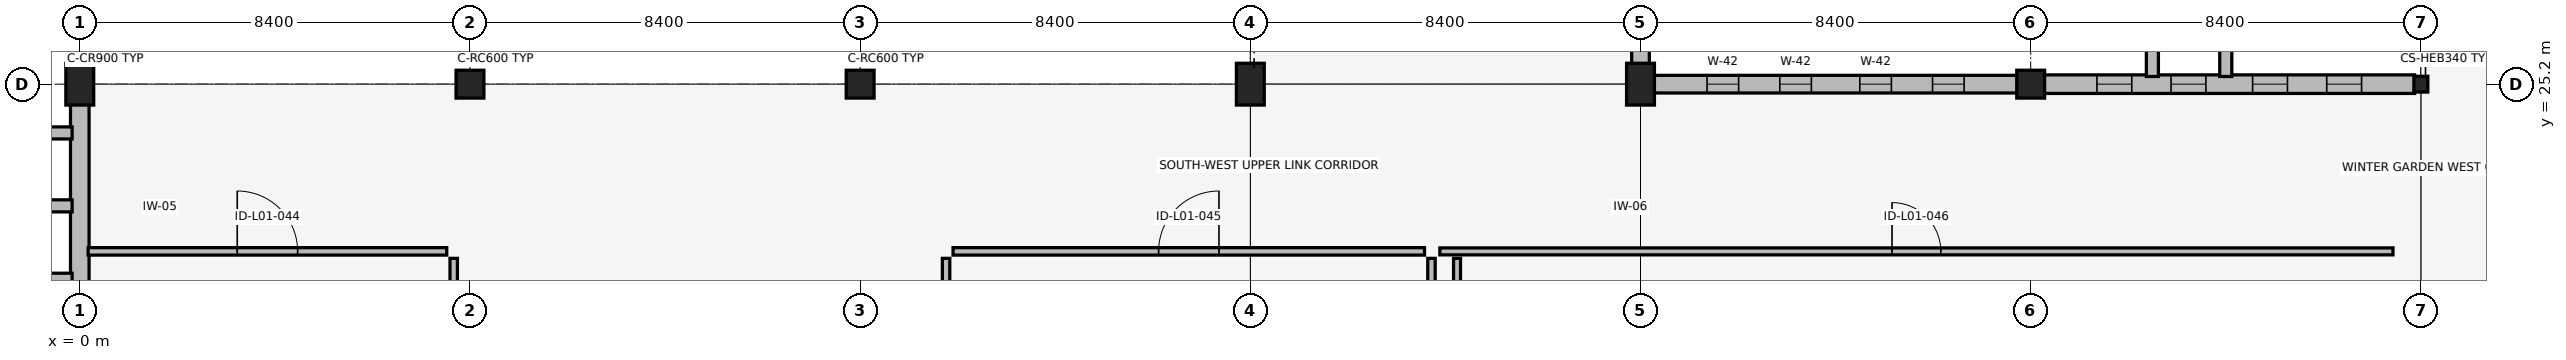
"""IFC4 building model, lengths in metres.
Left out: names, types, materials, properties, quantities, classifications, styles, units other than length and angle.
Written with IfcOpenShell. Run it as: python <this file> out.ifc"""

import sys

from ifc_helpers import new_model, si_unit, direction, frame, frame_2d, origin, origin_2d, place, context, subcontext, project, spatial, rectangle, i_section, extrude, element, fill, save


model = new_model("IFC4")
c1 = context("Model", 3, precision=1e-05, world=origin(), true_north=direction((0.0, 1.0)))
c2 = subcontext(c1, "Body", "Model", "MODEL_VIEW")
j1 = project(units=[si_unit("LENGTHUNIT", "METRE"), si_unit("PLANEANGLEUNIT", "RADIAN")], contexts=[c1])
p1 = place(None, origin())
s1 = spatial("IfcSite", under=j1, at=p1, CompositionType="ELEMENT")
p2 = place(p1, origin())
s2 = spatial("IfcBuilding", under=s1, at=p2, CompositionType="ELEMENT")
p3 = place(p2, frame((0.0, 0.0, 5.44)))
s3 = spatial("IfcBuildingStorey", under=s2, at=p3, CompositionType="ELEMENT", Elevation=5.44)
p4 = place(p3, frame((0.0, 25.2, 0.0), z_axis=(0.0, 0.0, 1.0), x_axis=(1.0, 0.0, 0.0)))
e1 = element("IfcColumn", 1, at=p4, inside=s3, PredefinedType="COLUMN", context=c2, shape_type="SweptSolid", body=[
    extrude(rectangle(XDim=0.6, YDim=0.9, at=origin_2d()), origin(), (0.0, 0.0, 1.0), 4.12),
])
for number, where, z_axis, x_axis in (
    (2, (8.4, 25.2, -0.28), (0.0, 0.0, 1.0), (1.0, 0.0, 0.0)),
    (3, (16.8, 25.2, -0.28), (0.0, 0.0, 1.0), (1.0, 0.0, 0.0)),
):
    element("IfcColumn", number, at=place(p3, frame(where, z_axis=z_axis, x_axis=x_axis)), inside=s3, PredefinedType="COLUMN", context=c2, shape_type="SweptSolid", body=[
        extrude(rectangle(XDim=0.6, YDim=0.6, at=origin_2d()), origin(), (0.0, 0.0, 1.0), 4.4),
    ])
for number, where, z_axis, x_axis in (
    (4, (25.2, 25.2, 0.0), (0.0, 0.0, 1.0), (1.0, 0.0, 0.0)),
    (5, (33.6, 25.2, 0.0), (0.0, 0.0, 1.0), (1.0, 0.0, 0.0)),
):
    element("IfcColumn", number, at=place(p3, frame(where, z_axis=z_axis, x_axis=x_axis)), inside=s3, PredefinedType="COLUMN", context=c2, shape_type="SweptSolid", body=[
        extrude(rectangle(XDim=0.6, YDim=0.9, at=origin_2d()), origin(), (0.0, 0.0, 1.0), 4.12),
    ])
p5 = place(p3, frame((42.0, 25.2, 0.0), z_axis=(0.0, 0.0, 1.0), x_axis=(1.0, 0.0, 0.0)))
e6 = element("IfcColumn", 6, at=p5, inside=s3, PredefinedType="COLUMN", context=c2, shape_type="SweptSolid", body=[
    extrude(rectangle(XDim=0.6, YDim=0.6, at=origin_2d()), origin(), (0.0, 0.0, 1.0), 4.12),
])
p6 = place(p3, frame((50.4, 25.2, 0.0), z_axis=(0.0, 0.0, 1.0), x_axis=(1.0, 0.0, 0.0)))
e7 = element("IfcColumn", 7, at=p6, inside=s3, PredefinedType="COLUMN", context=c2, shape_type="SweptSolid", body=[
    extrude(i_section(OverallWidth=0.3, OverallDepth=0.34, WebThickness=0.012, FlangeThickness=0.021, FilletRadius=0.027, at=origin_2d()), origin(), (0.0, 0.0, 1.0), 4.12),
])
p7 = place(p3, frame((0.0, 17.025, 0.0), z_axis=(0.0, 0.0, 1.0), x_axis=(0.0, 1.0, 0.0)))
e8 = element("IfcWall", 8, at=p7, inside=s3, PredefinedType="SOLIDWALL", context=c2, shape_type="SweptSolid", body=[
    extrude(rectangle(XDim=7.74, YDim=0.4, at=frame_2d((3.87, 0.0))), origin(), (0.0, 0.0, 1.0), 4.12),
])
p8 = place(p7, frame((2.539, 0.0, 0.75)))
e9 = element("IfcOpeningElement", 9, at=p8, cuts=e8, PredefinedType="OPENING", context=c2, shape_type="SweptSolid", body=[
    extrude(rectangle(XDim=0.96, YDim=3.1, at=frame_2d((0.48, 1.55))), frame((0.0, 0.21, 0.0), z_axis=(0.0, -1.0, 0.0), x_axis=(1.0, 0.0, 0.0)), (0.0, 0.0, 1.0), 0.42),
])
for number, where, z_axis, x_axis in (
    (10, (-0.165, 21.0, 0.0), (0.0, 0.0, 1.0), (-1.0, 0.0, 0.0)),
    (11, (-0.165, 22.58, 0.0), (0.0, 0.0, 1.0), (-1.0, 0.0, 0.0)),
    (12, (-0.165, 24.15, 0.0), (0.0, 0.0, 1.0), (-1.0, 0.0, 0.0)),
):
    element("IfcWall", number, at=place(p3, frame(where, z_axis=z_axis, x_axis=x_axis)), inside=s3, PredefinedType="SOLIDWALL", context=c2, shape_type="SweptSolid", body=[
        extrude(rectangle(XDim=0.7, YDim=0.26, at=frame_2d((0.35, 0.0))), origin(), (0.0, 0.0, 1.0), 4.42),
    ])
p9 = place(p3, frame((0.0, 25.635, 0.0), z_axis=(0.0, 0.0, 1.0), x_axis=(0.0, 1.0, 0.0)))
e13 = element("IfcWall", 13, at=p9, inside=s3, PredefinedType="SOLIDWALL", context=c2, shape_type="SweptSolid", body=[
    extrude(rectangle(XDim=7.53, YDim=0.38, at=frame_2d((3.765, 0.0))), origin(), (0.0, 0.0, 1.0), 3.46),
])
p10 = place(p3, frame((33.6, 25.635, 0.0), z_axis=(0.0, 0.0, 1.0), x_axis=(0.0, 1.0, 0.0)))
e14 = element("IfcWall", 14, at=p10, inside=s3, PredefinedType="SOLIDWALL", context=c2, shape_type="SweptSolid", body=[
    extrude(rectangle(XDim=7.53, YDim=0.38, at=frame_2d((3.765, 0.0))), origin(), (0.0, 0.0, 1.0), 4.02),
])
p11 = place(p3, frame((33.885, 25.2, 0.0), z_axis=(0.0, 0.0, 1.0), x_axis=(1.0, 0.0, 0.0)))
e15 = element("IfcWall", 15, at=p11, inside=s3, PredefinedType="SOLIDWALL", context=c2, shape_type="SweptSolid", body=[
    extrude(rectangle(XDim=7.83, YDim=0.38, at=frame_2d((3.915, 0.0))), origin(), (0.0, 0.0, 1.0), 3.76),
])
p12 = place(p11, frame((1.148, 0.0, 0.75)))
e16 = element("IfcOpeningElement", 16, at=p12, cuts=e15, PredefinedType="OPENING", context=c2, shape_type="SweptSolid", body=[
    extrude(rectangle(XDim=0.68, YDim=2.3, at=frame_2d((0.34, 1.15))), frame((0.0, 0.2, 0.0), z_axis=(0.0, -1.0, 0.0), x_axis=(1.0, 0.0, 0.0)), (0.0, 0.0, 1.0), 0.4),
])
p13 = place(p11, frame((2.714, 0.0, 0.75)))
e17 = element("IfcOpeningElement", 17, at=p13, cuts=e15, PredefinedType="OPENING", context=c2, shape_type="SweptSolid", body=[
    extrude(rectangle(XDim=0.68, YDim=2.3, at=frame_2d((0.34, 1.15))), frame((0.0, 0.2, 0.0), z_axis=(0.0, -1.0, 0.0), x_axis=(1.0, 0.0, 0.0)), (0.0, 0.0, 1.0), 0.4),
])
p14 = place(p11, frame((4.436, 0.0, 0.75)))
e18 = element("IfcOpeningElement", 18, at=p14, cuts=e15, PredefinedType="OPENING", context=c2, shape_type="SweptSolid", body=[
    extrude(rectangle(XDim=0.68, YDim=2.3, at=frame_2d((0.34, 1.15))), frame((0.0, 0.2, 0.0), z_axis=(0.0, -1.0, 0.0), x_axis=(1.0, 0.0, 0.0)), (0.0, 0.0, 1.0), 0.4),
])
p15 = place(p11, frame((6.002, 0.0, 0.75)))
e19 = element("IfcOpeningElement", 19, at=p15, cuts=e15, PredefinedType="OPENING", context=c2, shape_type="SweptSolid", body=[
    extrude(rectangle(XDim=0.68, YDim=2.3, at=frame_2d((0.34, 1.15))), frame((0.0, 0.2, 0.0), z_axis=(0.0, -1.0, 0.0), x_axis=(1.0, 0.0, 0.0)), (0.0, 0.0, 1.0), 0.4),
])
p16 = place(p3, frame((42.285, 25.2, 0.0), z_axis=(0.0, 0.0, 1.0), x_axis=(1.0, 0.0, 0.0)))
e20 = element("IfcWall", 20, at=p16, inside=s3, PredefinedType="SOLIDWALL", context=c2, shape_type="SweptSolid", body=[
    extrude(rectangle(XDim=7.98, YDim=0.4, at=frame_2d((3.99, 0.0))), origin(), (0.0, 0.0, 1.0), 3.76),
])
p17 = place(p16, frame((1.141, 0.0, 0.75)))
e21 = element("IfcOpeningElement", 21, at=p17, cuts=e20, PredefinedType="OPENING", context=c2, shape_type="SweptSolid", body=[
    extrude(rectangle(XDim=0.75, YDim=2.1, at=frame_2d((0.375, 1.05))), frame((0.0, 0.21, 0.0), z_axis=(0.0, -1.0, 0.0), x_axis=(1.0, 0.0, 0.0)), (0.0, 0.0, 1.0), 0.42),
])
p18 = place(p16, frame((2.737, 0.0, 0.75)))
e22 = element("IfcOpeningElement", 22, at=p18, cuts=e20, PredefinedType="OPENING", context=c2, shape_type="SweptSolid", body=[
    extrude(rectangle(XDim=0.75, YDim=2.1, at=frame_2d((0.375, 1.05))), frame((0.0, 0.21, 0.0), z_axis=(0.0, -1.0, 0.0), x_axis=(1.0, 0.0, 0.0)), (0.0, 0.0, 1.0), 0.42),
])
p19 = place(p16, frame((4.493, 0.0, 0.75)))
e23 = element("IfcOpeningElement", 23, at=p19, cuts=e20, PredefinedType="OPENING", context=c2, shape_type="SweptSolid", body=[
    extrude(rectangle(XDim=0.75, YDim=2.1, at=frame_2d((0.375, 1.05))), frame((0.0, 0.21, 0.0), z_axis=(0.0, -1.0, 0.0), x_axis=(1.0, 0.0, 0.0)), (0.0, 0.0, 1.0), 0.42),
])
p20 = place(p16, frame((6.089, 0.0, 0.75)))
e24 = element("IfcOpeningElement", 24, at=p20, cuts=e20, PredefinedType="OPENING", context=c2, shape_type="SweptSolid", body=[
    extrude(rectangle(XDim=0.75, YDim=2.1, at=frame_2d((0.375, 1.05))), frame((0.0, 0.21, 0.0), z_axis=(0.0, -1.0, 0.0), x_axis=(1.0, 0.0, 0.0)), (0.0, 0.0, 1.0), 0.42),
])
for number, where, z_axis, x_axis in (
    (25, (44.62, 25.365, 0.0), (0.0, 0.0, 1.0), (0.0, 1.0, 0.0)),
    (26, (46.2, 25.365, 0.0), (0.0, 0.0, 1.0), (0.0, 1.0, 0.0)),
):
    element("IfcWall", number, at=place(p3, frame(where, z_axis=z_axis, x_axis=x_axis)), inside=s3, PredefinedType="SOLIDWALL", context=c2, shape_type="SweptSolid", body=[
        extrude(rectangle(XDim=0.7, YDim=0.26, at=frame_2d((0.35, 0.0))), origin(), (0.0, 0.0, 1.0), 4.42),
    ])
p21 = place(p3, frame((0.18, 21.6, 0.0), z_axis=(0.0, 0.0, 1.0), x_axis=(1.0, 0.0, 0.0)))
e27 = element("IfcWall", 27, at=p21, inside=s3, PredefinedType="PARTITIONING", context=c2, shape_type="SweptSolid", body=[
    extrude(rectangle(XDim=7.72, YDim=0.16, at=frame_2d((3.86, 0.0))), origin(), (0.0, 0.0, 1.0), 4.12),
])
p22 = place(p21, frame((3.21, 0.0, 0.0)))
e28 = element("IfcOpeningElement", 28, at=p22, cuts=e27, PredefinedType="OPENING", context=c2, shape_type="SweptSolid", body=[
    extrude(rectangle(XDim=1.3, YDim=2.2, at=frame_2d((0.65, 1.1))), frame((0.0, 0.09, 0.0), z_axis=(0.0, -1.0, 0.0), x_axis=(1.0, 0.0, 0.0)), (0.0, 0.0, 1.0), 0.18),
])
p23 = place(p3, frame((8.05, 8.685, 0.0), z_axis=(0.0, 0.0, 1.0), x_axis=(0.0, 1.0, 0.0)))
e29 = element("IfcWall", 29, at=p23, inside=s3, PredefinedType="PARTITIONING", context=c2, shape_type="SweptSolid", body=[
    extrude(rectangle(XDim=12.765, YDim=0.16, at=frame_2d((6.382, 0.0))), origin(), (0.0, 0.0, 1.0), 4.12),
])
p24 = place(p3, frame((18.8, 21.6, 0.0), z_axis=(0.0, 0.0, 1.0), x_axis=(1.0, 0.0, 0.0)))
e30 = element("IfcWall", 30, at=p24, inside=s3, PredefinedType="PARTITIONING", context=c2, shape_type="SweptSolid", body=[
    extrude(rectangle(XDim=10.15, YDim=0.16, at=frame_2d((5.075, 0.0))), origin(), (0.0, 0.0, 1.0), 4.12),
])
p25 = place(p24, frame((4.425, 0.0, 0.0)))
e31 = element("IfcOpeningElement", 31, at=p25, cuts=e30, PredefinedType="OPENING", context=c2, shape_type="SweptSolid", body=[
    extrude(rectangle(XDim=1.3, YDim=2.2, at=frame_2d((0.65, 1.1))), frame((0.0, 0.09, 0.0), z_axis=(0.0, -1.0, 0.0), x_axis=(1.0, 0.0, 0.0)), (0.0, 0.0, 1.0), 0.18),
])
p26 = place(p3, frame((18.65, 0.28, 0.0), z_axis=(0.0, 0.0, 1.0), x_axis=(0.0, 1.0, 0.0)))
e32 = element("IfcWall", 32, at=p26, inside=s3, PredefinedType="PARTITIONING", context=c2, shape_type="SweptSolid", body=[
    extrude(rectangle(XDim=21.17, YDim=0.16, at=frame_2d((10.585, 0.0))), origin(), (0.0, 0.0, 1.0), 4.12),
])
p27 = place(p3, frame((29.1, 0.18, 0.0), z_axis=(0.0, 0.0, 1.0), x_axis=(0.0, 1.0, 0.0)))
e33 = element("IfcWall", 33, at=p27, inside=s3, PredefinedType="PARTITIONING", context=c2, shape_type="SweptSolid", body=[
    extrude(rectangle(XDim=21.27, YDim=0.16, at=frame_2d((10.635, 0.0))), origin(), (0.0, 0.0, 1.0), 4.12),
])
p28 = place(p3, frame((29.28, 21.6, 0.0), z_axis=(0.0, 0.0, 1.0), x_axis=(1.0, 0.0, 0.0)))
e34 = element("IfcWall", 34, at=p28, inside=s3, PredefinedType="PARTITIONING", context=c2, shape_type="SweptSolid", body=[
    extrude(rectangle(XDim=20.52, YDim=0.15, at=frame_2d((10.26, 0.0))), origin(), (0.0, 0.0, 1.0), 4.12),
])
p29 = place(p28, frame((9.735, 0.0, 0.0)))
e35 = element("IfcOpeningElement", 35, at=p29, cuts=e34, PredefinedType="OPENING", context=c2, shape_type="SweptSolid", body=[
    extrude(rectangle(XDim=1.05, YDim=2.15, at=frame_2d((0.525, 1.075))), frame((0.0, 0.085, 0.0), z_axis=(0.0, -1.0, 0.0), x_axis=(1.0, 0.0, 0.0)), (0.0, 0.0, 1.0), 0.17),
])
p30 = place(p3, frame((29.65, 0.18, 0.0), z_axis=(0.0, 0.0, 1.0), x_axis=(0.0, 1.0, 0.0)))
e36 = element("IfcWall", 36, at=p30, inside=s3, PredefinedType="PARTITIONING", context=c2, shape_type="SweptSolid", body=[
    extrude(rectangle(XDim=21.27, YDim=0.15, at=frame_2d((10.635, 0.0))), origin(), (0.0, 0.0, 1.0), 4.12),
])
p31 = place(p12, origin())
e37 = element("IfcWindow", 37, at=p31, inside=s3, PartitioningType="DOUBLE_PANEL_VERTICAL", PredefinedType="WINDOW", context=c2, shape_type="SweptSolid", body=[
    extrude(rectangle(XDim=0.68, YDim=2.3, at=frame_2d((0.34, 1.15))), frame((0.0, 0.03, 0.0), z_axis=(0.0, -1.0, 0.0), x_axis=(1.0, 0.0, 0.0)), (0.0, 0.0, 1.0), 0.06),
])
fill(e16, e37)
p32 = place(p13, origin())
e38 = element("IfcWindow", 38, at=p32, inside=s3, PartitioningType="DOUBLE_PANEL_VERTICAL", PredefinedType="WINDOW", context=c2, shape_type="SweptSolid", body=[
    extrude(rectangle(XDim=0.68, YDim=2.3, at=frame_2d((0.34, 1.15))), frame((0.0, 0.03, 0.0), z_axis=(0.0, -1.0, 0.0), x_axis=(1.0, 0.0, 0.0)), (0.0, 0.0, 1.0), 0.06),
])
fill(e17, e38)
p33 = place(p14, origin())
e39 = element("IfcWindow", 39, at=p33, inside=s3, PartitioningType="DOUBLE_PANEL_VERTICAL", PredefinedType="WINDOW", context=c2, shape_type="SweptSolid", body=[
    extrude(rectangle(XDim=0.68, YDim=2.3, at=frame_2d((0.34, 1.15))), frame((0.0, 0.03, 0.0), z_axis=(0.0, -1.0, 0.0), x_axis=(1.0, 0.0, 0.0)), (0.0, 0.0, 1.0), 0.06),
])
fill(e18, e39)
p34 = place(p15, origin())
e40 = element("IfcWindow", 40, at=p34, inside=s3, PartitioningType="DOUBLE_PANEL_VERTICAL", PredefinedType="WINDOW", context=c2, shape_type="SweptSolid", body=[
    extrude(rectangle(XDim=0.68, YDim=2.3, at=frame_2d((0.34, 1.15))), frame((0.0, 0.03, 0.0), z_axis=(0.0, -1.0, 0.0), x_axis=(1.0, 0.0, 0.0)), (0.0, 0.0, 1.0), 0.06),
])
fill(e19, e40)
p35 = place(p17, origin())
e41 = element("IfcWindow", 41, at=p35, inside=s3, PartitioningType="DOUBLE_PANEL_VERTICAL", PredefinedType="WINDOW", context=c2, shape_type="SweptSolid", body=[
    extrude(rectangle(XDim=0.75, YDim=2.1, at=frame_2d((0.375, 1.05))), frame((0.0, 0.03, 0.0), z_axis=(0.0, -1.0, 0.0), x_axis=(1.0, 0.0, 0.0)), (0.0, 0.0, 1.0), 0.06),
])
fill(e21, e41)
p36 = place(p18, origin())
e42 = element("IfcWindow", 42, at=p36, inside=s3, PartitioningType="DOUBLE_PANEL_VERTICAL", PredefinedType="WINDOW", context=c2, shape_type="SweptSolid", body=[
    extrude(rectangle(XDim=0.75, YDim=2.1, at=frame_2d((0.375, 1.05))), frame((0.0, 0.03, 0.0), z_axis=(0.0, -1.0, 0.0), x_axis=(1.0, 0.0, 0.0)), (0.0, 0.0, 1.0), 0.06),
])
fill(e22, e42)
p37 = place(p19, origin())
e43 = element("IfcWindow", 43, at=p37, inside=s3, PartitioningType="DOUBLE_PANEL_VERTICAL", PredefinedType="WINDOW", context=c2, shape_type="SweptSolid", body=[
    extrude(rectangle(XDim=0.75, YDim=2.1, at=frame_2d((0.375, 1.05))), frame((0.0, 0.03, 0.0), z_axis=(0.0, -1.0, 0.0), x_axis=(1.0, 0.0, 0.0)), (0.0, 0.0, 1.0), 0.06),
])
fill(e23, e43)
p38 = place(p20, origin())
e44 = element("IfcWindow", 44, at=p38, inside=s3, PartitioningType="DOUBLE_PANEL_VERTICAL", PredefinedType="WINDOW", context=c2, shape_type="SweptSolid", body=[
    extrude(rectangle(XDim=0.75, YDim=2.1, at=frame_2d((0.375, 1.05))), frame((0.0, 0.03, 0.0), z_axis=(0.0, -1.0, 0.0), x_axis=(1.0, 0.0, 0.0)), (0.0, 0.0, 1.0), 0.06),
])
fill(e24, e44)
p39 = place(p22, origin())
e45 = element("IfcDoor", 45, at=p39, inside=s3, OperationType="SINGLE_SWING_LEFT", PredefinedType="DOOR", context=c2, shape_type="SweptSolid", body=[
    extrude(rectangle(XDim=1.3, YDim=2.2, at=frame_2d((0.65, 1.1))), frame((0.0, 0.025, 0.0), z_axis=(0.0, -1.0, 0.0), x_axis=(1.0, 0.0, 0.0)), (0.0, 0.0, 1.0), 0.05),
])
fill(e28, e45)
p40 = place(p25, origin())
e46 = element("IfcDoor", 46, at=p40, inside=s3, OperationType="SINGLE_SWING_RIGHT", PredefinedType="DOOR", context=c2, shape_type="SweptSolid", body=[
    extrude(rectangle(XDim=1.3, YDim=2.2, at=frame_2d((0.65, 1.1))), frame((0.0, 0.025, 0.0), z_axis=(0.0, -1.0, 0.0), x_axis=(1.0, 0.0, 0.0)), (0.0, 0.0, 1.0), 0.05),
])
fill(e31, e46)
p41 = place(p29, origin())
e47 = element("IfcDoor", 47, at=p41, inside=s3, OperationType="SINGLE_SWING_LEFT", PredefinedType="DOOR", context=c2, shape_type="SweptSolid", body=[
    extrude(rectangle(XDim=1.05, YDim=2.15, at=frame_2d((0.525, 1.075))), frame((0.0, 0.025, 0.0), z_axis=(0.0, -1.0, 0.0), x_axis=(1.0, 0.0, 0.0)), (0.0, 0.0, 1.0), 0.05),
])
fill(e35, e47)
save(model, sys.argv[1])
